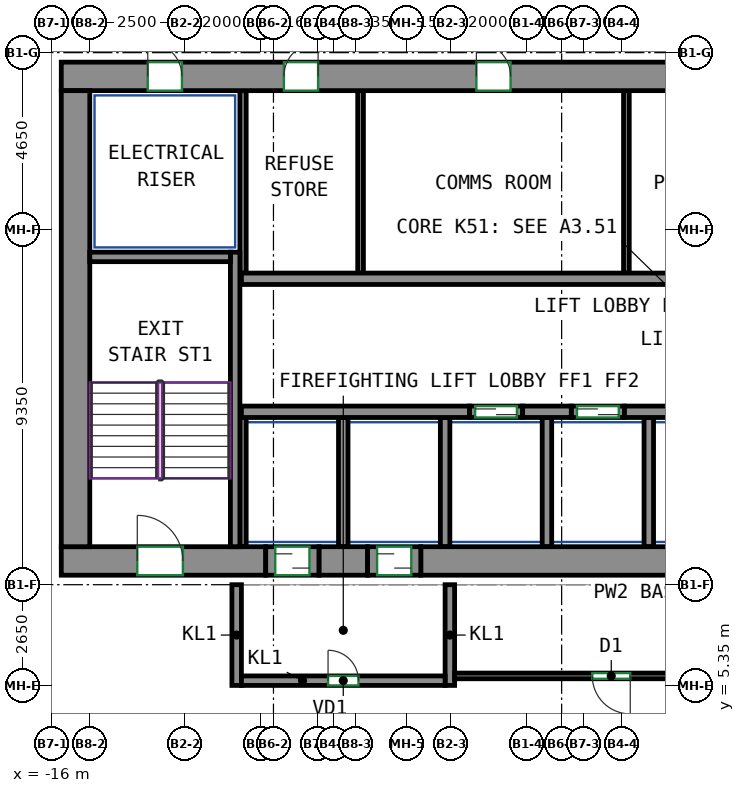
"""IFC4 building model, lengths in metres.
Left out: names, types, materials, properties, quantities, classifications, styles, units other than length and angle.
Written with IfcOpenShell. Run it as: python <this file> out.ifc"""

import sys

from ifc_helpers import new_model, si_unit, direction, frame, frame_2d, origin, place, context, subcontext, project, spatial, rectangle, extrude, source, transform, mapped, element, fill, save


model = new_model("IFC4")
c1 = context("Model", 3, precision=1e-05, world=origin(), true_north=direction((0.0, 1.0)))
c2 = subcontext(c1, "Body", "Model", "MODEL_VIEW")
j1 = project(units=[si_unit("LENGTHUNIT", "METRE"), si_unit("PLANEANGLEUNIT", "RADIAN")], contexts=[c1])
p1 = place(None, origin())
s1 = spatial("IfcSite", under=j1, at=p1, CompositionType="ELEMENT")
p2 = place(p1, origin())
s2 = spatial("IfcBuilding", under=s1, at=p2, CompositionType="ELEMENT")
p3 = place(p2, frame((0.0, 0.0, 206.7)))
s3 = spatial("IfcBuildingStorey", under=s2, at=p3, CompositionType="ELEMENT", Elevation=206.7)
m1 = source(origin(), c2, "Body", "SweptSolid", [
    extrude(rectangle(XDim=5.38, YDim=0.75, at=frame_2d((2.69, 0.0))), origin(), (0.0, 0.0, 1.0), 3.12),
])
p4 = place(p3, frame((-15.75, 8.625, 0.0), z_axis=(0.0, 0.0, 1.0), x_axis=(1.0, 0.0, 0.0)))
e1 = element("IfcWall", 1, at=p4, inside=s3, PredefinedType="SHEAR", context=c2, shape_type="MappedRepresentation", body=[
    mapped(m1, transform((0.0, 0.0, 0.0))),
])
p5 = place(p4, frame((2.0, 0.0, 0.0)))
e2 = element("IfcOpeningElement", 2, at=p5, cuts=e1, PredefinedType="OPENING", context=c2, shape_type="SweptSolid", body=[
    extrude(rectangle(XDim=1.2, YDim=2.1, at=frame_2d((0.6, 1.05))), frame((0.0, 0.385, 0.0), z_axis=(0.0, -1.0, 0.0), x_axis=(1.0, 0.0, 0.0)), (0.0, 0.0, 1.0), 0.77),
])
m2 = source(origin(), c2, "Body", "SweptSolid", [
    extrude(rectangle(XDim=1.28, YDim=0.75, at=frame_2d((0.64, 0.0))), origin(), (0.0, 0.0, 1.0), 3.12),
])
p6 = place(p3, frame((-8.97, 8.625, 0.0), z_axis=(0.0, 0.0, 1.0), x_axis=(1.0, 0.0, 0.0)))
e3 = element("IfcWall", 3, at=p6, inside=s3, PredefinedType="SHEAR", context=c2, shape_type="MappedRepresentation", body=[
    mapped(m2, transform((0.0, 0.0, 0.0))),
])
m3 = source(origin(), c2, "Body", "SweptSolid", [
    extrude(rectangle(XDim=14.18, YDim=0.75, at=frame_2d((7.09, 0.0))), origin(), (0.0, 0.0, 1.0), 3.12),
])
p7 = place(p3, frame((-6.29, 8.625, 0.0), z_axis=(0.0, 0.0, 1.0), x_axis=(1.0, 0.0, 0.0)))
e4 = element("IfcWall", 4, at=p7, inside=s3, PredefinedType="SHEAR", context=c2, shape_type="MappedRepresentation", body=[
    mapped(m3, transform((0.0, 0.0, 0.0))),
])
m4 = source(origin(), c2, "Body", "SweptSolid", [
    extrude(rectangle(XDim=33.6, YDim=0.75, at=frame_2d((16.8, 0.0))), origin(), (0.0, 0.0, 1.0), 3.12),
])
p8 = place(p3, frame((-15.75, 21.375, 0.0), z_axis=(0.0, 0.0, 1.0), x_axis=(1.0, 0.0, 0.0)))
e5 = element("IfcWall", 5, at=p8, inside=s3, PredefinedType="SHEAR", context=c2, shape_type="MappedRepresentation", body=[
    mapped(m4, transform((0.0, 0.0, 0.0))),
])
p9 = place(p8, frame((5.858, 0.0, 0.0)))
e6 = element("IfcOpeningElement", 6, at=p9, cuts=e5, PredefinedType="OPENING", context=c2, shape_type="SweptSolid", body=[
    extrude(rectangle(XDim=0.9, YDim=2.1, at=frame_2d((0.45, 1.05))), frame((0.0, 0.385, 0.0), z_axis=(0.0, -1.0, 0.0), x_axis=(1.0, 0.0, 0.0)), (0.0, 0.0, 1.0), 0.77),
])
p10 = place(p8, frame((10.923, 0.0, 0.0)))
e7 = element("IfcOpeningElement", 7, at=p10, cuts=e5, PredefinedType="OPENING", context=c2, shape_type="SweptSolid", body=[
    extrude(rectangle(XDim=0.9, YDim=2.1, at=frame_2d((0.45, 1.05))), frame((0.0, 0.385, 0.0), z_axis=(0.0, -1.0, 0.0), x_axis=(1.0, 0.0, 0.0)), (0.0, 0.0, 1.0), 0.77),
])
p11 = place(p8, frame((16.055, 0.0, 0.0)))
e8 = element("IfcOpeningElement", 8, at=p11, cuts=e5, PredefinedType="OPENING", context=c2, shape_type="SweptSolid", body=[
    extrude(rectangle(XDim=0.9, YDim=2.1, at=frame_2d((0.45, 1.05))), frame((0.0, 0.385, 0.0), z_axis=(0.0, -1.0, 0.0), x_axis=(1.0, 0.0, 0.0)), (0.0, 0.0, 1.0), 0.77),
])
p12 = place(p8, frame((20.879, 0.0, 0.0)))
e9 = element("IfcOpeningElement", 9, at=p12, cuts=e5, PredefinedType="OPENING", context=c2, shape_type="SweptSolid", body=[
    extrude(rectangle(XDim=0.9, YDim=2.1, at=frame_2d((0.45, 1.05))), frame((0.0, 0.385, 0.0), z_axis=(0.0, -1.0, 0.0), x_axis=(1.0, 0.0, 0.0)), (0.0, 0.0, 1.0), 0.77),
])
p13 = place(p8, frame((26.239, 0.0, 0.0)))
e10 = element("IfcOpeningElement", 10, at=p13, cuts=e5, PredefinedType="OPENING", context=c2, shape_type="SweptSolid", body=[
    extrude(rectangle(XDim=0.9, YDim=2.1, at=frame_2d((0.45, 1.05))), frame((0.0, 0.385, 0.0), z_axis=(0.0, -1.0, 0.0), x_axis=(1.0, 0.0, 0.0)), (0.0, 0.0, 1.0), 0.77),
])
p14 = place(p8, frame((2.275, 0.0, 0.0)))
e11 = element("IfcOpeningElement", 11, at=p14, cuts=e5, PredefinedType="OPENING", context=c2, shape_type="SweptSolid", body=[
    extrude(rectangle(XDim=0.9, YDim=2.1, at=frame_2d((0.45, 1.05))), frame((0.0, 0.385, 0.0), z_axis=(0.0, -1.0, 0.0), x_axis=(1.0, 0.0, 0.0)), (0.0, 0.0, 1.0), 0.77),
])
p15 = place(p8, frame((30.425, 0.0, 0.0)))
e12 = element("IfcOpeningElement", 12, at=p15, cuts=e5, PredefinedType="OPENING", context=c2, shape_type="SweptSolid", body=[
    extrude(rectangle(XDim=0.9, YDim=2.1, at=frame_2d((0.45, 1.05))), frame((0.0, 0.385, 0.0), z_axis=(0.0, -1.0, 0.0), x_axis=(1.0, 0.0, 0.0)), (0.0, 0.0, 1.0), 0.77),
])
m5 = source(origin(), c2, "Body", "SweptSolid", [
    extrude(rectangle(XDim=12.0, YDim=0.75, at=frame_2d((6.0, 0.0))), origin(), (0.0, 0.0, 1.0), 3.12),
])
p16 = place(p3, frame((-15.375, 9.0, 0.0), z_axis=(0.0, 0.0, 1.0), x_axis=(0.0, 1.0, 0.0)))
e13 = element("IfcWall", 13, at=p16, inside=s3, PredefinedType="SHEAR", context=c2, shape_type="MappedRepresentation", body=[
    mapped(m5, transform((0.0, 0.0, 0.0))),
])
m6 = source(origin(), c2, "Body", "SweptSolid", [
    extrude(rectangle(XDim=7.75, YDim=0.25, at=frame_2d((3.875, 0.0))), origin(), (0.0, 0.0, 1.0), 3.12),
])
p17 = place(p3, frame((-11.175, 9.0, 0.0), z_axis=(0.0, 0.0, 1.0), x_axis=(0.0, 1.0, 0.0)))
e14 = element("IfcWall", 14, at=p17, inside=s3, PredefinedType="SHEAR", context=c2, shape_type="MappedRepresentation", body=[
    mapped(m6, transform((0.0, 0.0, 0.0))),
])
m7 = source(origin(), c2, "Body", "SweptSolid", [
    extrude(rectangle(XDim=3.7, YDim=0.25, at=frame_2d((1.85, 0.0))), origin(), (0.0, 0.0, 1.0), 3.12),
])
p18 = place(p3, frame((-15.0, 16.625, 0.0), z_axis=(0.0, 0.0, 1.0), x_axis=(1.0, 0.0, 0.0)))
e15 = element("IfcWall", 15, at=p18, inside=s3, PredefinedType="SHEAR", context=c2, shape_type="MappedRepresentation", body=[
    mapped(m7, transform((0.0, 0.0, 0.0))),
])
m8 = source(origin(), c2, "Body", "SweptSolid", [
    extrude(rectangle(XDim=6.0, YDim=0.3, at=frame_2d((3.0, 0.0))), origin(), (0.0, 0.0, 1.0), 3.12),
])
p19 = place(p3, frame((-11.01, 12.55, 0.0), z_axis=(0.0, 0.0, 1.0), x_axis=(1.0, 0.0, 0.0)))
e16 = element("IfcWall", 16, at=p19, inside=s3, PredefinedType="SHEAR", context=c2, shape_type="MappedRepresentation", body=[
    mapped(m8, transform((0.0, 0.0, 0.0))),
])
m9 = source(origin(), c2, "Body", "SweptSolid", [
    extrude(rectangle(XDim=1.28, YDim=0.3, at=frame_2d((0.64, 0.0))), origin(), (0.0, 0.0, 1.0), 3.12),
])
for number, where, z_axis, x_axis in (
    (17, (-3.61, 12.55, 0.0), (0.0, 0.0, 1.0), (1.0, 0.0, 0.0)),
    (18, (-0.93, 12.55, 0.0), (0.0, 0.0, 1.0), (1.0, 0.0, 0.0)),
):
    element("IfcWall", number, at=place(p3, frame(where, z_axis=z_axis, x_axis=x_axis)), inside=s3, PredefinedType="SHEAR", context=c2, shape_type="MappedRepresentation", body=[
        mapped(m9, transform((0.0, 0.0, 0.0))),
    ])
m10 = source(origin(), c2, "Body", "SweptSolid", [
    extrude(rectangle(XDim=14.04, YDim=0.3, at=frame_2d((7.02, 0.0))), origin(), (0.0, 0.0, 1.0), 3.12),
])
p20 = place(p3, frame((-11.01, 16.05, 0.0), z_axis=(0.0, 0.0, 1.0), x_axis=(1.0, 0.0, 0.0)))
e19 = element("IfcWall", 19, at=p20, inside=s3, PredefinedType="SHEAR", context=c2, shape_type="MappedRepresentation", body=[
    mapped(m10, transform((0.0, 0.0, 0.0))),
])
m11 = source(origin(), c2, "Body", "SweptSolid", [
    extrude(rectangle(XDim=1.4, YDim=0.3, at=frame_2d((0.7, 0.0))), origin(), (0.0, 0.0, 1.0), 3.12),
])
p21 = place(p3, frame((-5.01, 12.55, 0.0), z_axis=(0.0, 0.0, 1.0), x_axis=(1.0, 0.0, 0.0)))
e20 = element("IfcWall", 20, at=p21, inside=s3, PredefinedType="PARTITIONING", context=c2, shape_type="MappedRepresentation", body=[
    mapped(m11, transform((0.0, 0.0, 0.0))),
])
p22 = place(p21, frame((0.15, 0.0, 0.0)))
e21 = element("IfcOpeningElement", 21, at=p22, cuts=e20, PredefinedType="OPENING", context=c2, shape_type="SweptSolid", body=[
    extrude(rectangle(XDim=1.1, YDim=2.1, at=frame_2d((0.55, 1.05))), frame((0.0, 0.16, 0.0), z_axis=(0.0, -1.0, 0.0), x_axis=(1.0, 0.0, 0.0)), (0.0, 0.0, 1.0), 0.32),
])
m12 = source(origin(), c2, "Body", "SweptSolid", [
    extrude(rectangle(XDim=1.4, YDim=0.3, at=frame_2d((0.7, 0.0))), origin(), (0.0, 0.0, 1.0), 3.12),
])
p23 = place(p3, frame((-2.33, 12.55, 0.0), z_axis=(0.0, 0.0, 1.0), x_axis=(1.0, 0.0, 0.0)))
e22 = element("IfcWall", 22, at=p23, inside=s3, PredefinedType="PARTITIONING", context=c2, shape_type="MappedRepresentation", body=[
    mapped(m12, transform((0.0, 0.0, 0.0))),
])
p24 = place(p23, frame((0.15, 0.0, 0.0)))
e23 = element("IfcOpeningElement", 23, at=p24, cuts=e22, PredefinedType="OPENING", context=c2, shape_type="SweptSolid", body=[
    extrude(rectangle(XDim=1.1, YDim=2.1, at=frame_2d((0.55, 1.05))), frame((0.0, 0.16, 0.0), z_axis=(0.0, -1.0, 0.0), x_axis=(1.0, 0.0, 0.0)), (0.0, 0.0, 1.0), 0.32),
])
m13 = source(origin(), c2, "Body", "SweptSolid", [
    extrude(rectangle(XDim=2.65, YDim=0.25, at=frame_2d((1.325, 0.0))), origin(), (0.0, 0.0, 1.0), 3.12),
])
for number, where, z_axis, x_axis in (
    (24, (-11.135, 5.35, 0.0), (0.0, 0.0, 1.0), (0.0, 1.0, 0.0)),
    (25, (-5.525, 5.35, 0.0), (0.0, 0.0, 1.0), (0.0, 1.0, 0.0)),
):
    element("IfcWall", number, at=place(p3, frame(where, z_axis=z_axis, x_axis=x_axis)), inside=s3, PredefinedType="PARTITIONING", context=c2, shape_type="MappedRepresentation", body=[
        mapped(m13, transform((0.0, 0.0, 0.0))),
    ])
m14 = source(origin(), c2, "Body", "SweptSolid", [
    extrude(rectangle(XDim=5.36, YDim=0.25, at=frame_2d((2.68, 0.0))), origin(), (0.0, 0.0, 1.0), 3.12),
])
p25 = place(p3, frame((-11.01, 5.475, 0.0), z_axis=(0.0, 0.0, 1.0), x_axis=(1.0, 0.0, 0.0)))
e26 = element("IfcWall", 26, at=p25, inside=s3, PredefinedType="PARTITIONING", context=c2, shape_type="MappedRepresentation", body=[
    mapped(m14, transform((0.0, 0.0, 0.0))),
])
p26 = place(p25, frame((2.28, 0.0, 0.0)))
e27 = element("IfcOpeningElement", 27, at=p26, cuts=e26, PredefinedType="OPENING", context=c2, shape_type="SweptSolid", body=[
    extrude(rectangle(XDim=0.8, YDim=2.0, at=frame_2d((0.4, 1.0))), frame((0.0, 0.135, 0.0), z_axis=(0.0, -1.0, 0.0), x_axis=(1.0, 0.0, 0.0)), (0.0, 0.0, 1.0), 0.27),
])
m15 = source(origin(), c2, "Body", "SweptSolid", [
    extrude(rectangle(XDim=4.8, YDim=0.165, at=frame_2d((2.4, 0.0))), origin(), (0.0, 0.0, 1.0), 3.12),
])
p27 = place(p3, frame((-10.968, 16.2, 0.0), z_axis=(0.0, 0.0, 1.0), x_axis=(0.0, 1.0, 0.0)))
e28 = element("IfcWall", 28, at=p27, inside=s3, PredefinedType="PARTITIONING", context=c2, shape_type="MappedRepresentation", body=[
    mapped(m15, transform((0.0, 0.0, 0.0))),
])
m16 = source(origin(), c2, "Body", "SweptSolid", [
    extrude(rectangle(XDim=3.4, YDim=0.25, at=frame_2d((1.7, 0.0))), origin(), (0.0, 0.0, 1.0), 3.12),
])
p28 = place(p3, frame((-0.29, 9.0, 0.0), z_axis=(0.0, 0.0, 1.0), x_axis=(0.0, 1.0, 0.0)))
e29 = element("IfcWall", 29, at=p28, inside=s3, PredefinedType="PARTITIONING", context=c2, shape_type="MappedRepresentation", body=[
    mapped(m16, transform((0.0, 0.0, 0.0))),
])
m17 = source(origin(), c2, "Body", "SweptSolid", [
    extrude(rectangle(XDim=3.4, YDim=0.165, at=frame_2d((1.7, 0.0))), origin(), (0.0, 0.0, 1.0), 3.12),
])
p29 = place(p3, frame((-10.968, 9.0, 0.0), z_axis=(0.0, 0.0, 1.0), x_axis=(0.0, 1.0, 0.0)))
e30 = element("IfcWall", 30, at=p29, inside=s3, PredefinedType="PARTITIONING", context=c2, shape_type="MappedRepresentation", body=[
    mapped(m17, transform((0.0, 0.0, 0.0))),
])
for number, where, z_axis, x_axis in (
    (31, (-2.97, 9.0, 0.0), (0.0, 0.0, 1.0), (0.0, 1.0, 0.0)),
    (32, (-5.65, 9.0, 0.0), (0.0, 0.0, 1.0), (0.0, 1.0, 0.0)),
    (33, (-8.33, 9.0, 0.0), (0.0, 0.0, 1.0), (0.0, 1.0, 0.0)),
):
    element("IfcWall", number, at=place(p3, frame(where, z_axis=z_axis, x_axis=x_axis)), inside=s3, PredefinedType="PARTITIONING", context=c2, shape_type="MappedRepresentation", body=[
        mapped(m16, transform((0.0, 0.0, 0.0))),
    ])
m18 = source(origin(), c2, "Body", "SweptSolid", [
    extrude(rectangle(XDim=4.8, YDim=0.15, at=frame_2d((2.4, 0.0))), origin(), (0.0, 0.0, 1.0), 3.12),
])
for number, where, z_axis, x_axis in (
    (34, (-7.875, 16.2, 0.0), (0.0, 0.0, 1.0), (0.0, 1.0, 0.0)),
    (35, (-0.88, 16.2, 0.0), (0.0, 0.0, 1.0), (0.0, 1.0, 0.0)),
):
    element("IfcWall", number, at=place(p3, frame(where, z_axis=z_axis, x_axis=x_axis)), inside=s3, PredefinedType="PARTITIONING", context=c2, shape_type="MappedRepresentation", body=[
        mapped(m18, transform((0.0, 0.0, 0.0))),
    ])
m19 = source(origin(), c2, "Body", "SweptSolid", [
    extrude(rectangle(XDim=1.4, YDim=0.75, at=frame_2d((0.7, 0.0))), origin(), (0.0, 0.0, 1.0), 2.7),
])
p30 = place(p3, frame((-10.37, 8.625, 0.0), z_axis=(0.0, 0.0, 1.0), x_axis=(1.0, 0.0, 0.0)))
e36 = element("IfcWall", 36, at=p30, inside=s3, PredefinedType="PARTITIONING", context=c2, shape_type="MappedRepresentation", body=[
    mapped(m19, transform((0.0, 0.0, 0.0))),
])
p31 = place(p30, frame((0.25, 0.0, 0.0)))
e37 = element("IfcOpeningElement", 37, at=p31, cuts=e36, PredefinedType="OPENING", context=c2, shape_type="SweptSolid", body=[
    extrude(rectangle(XDim=0.9, YDim=2.1, at=frame_2d((0.45, 1.05))), frame((0.0, 0.385, 0.0), z_axis=(0.0, -1.0, 0.0), x_axis=(1.0, 0.0, 0.0)), (0.0, 0.0, 1.0), 0.77),
])
m20 = source(origin(), c2, "Body", "SweptSolid", [
    extrude(rectangle(XDim=1.4, YDim=0.75, at=frame_2d((0.7, 0.0))), origin(), (0.0, 0.0, 1.0), 2.7),
])
p32 = place(p3, frame((-7.69, 8.625, 0.0), z_axis=(0.0, 0.0, 1.0), x_axis=(1.0, 0.0, 0.0)))
e38 = element("IfcWall", 38, at=p32, inside=s3, PredefinedType="PARTITIONING", context=c2, shape_type="MappedRepresentation", body=[
    mapped(m20, transform((0.0, 0.0, 0.0))),
])
p33 = place(p32, frame((0.25, 0.0, 0.0)))
e39 = element("IfcOpeningElement", 39, at=p33, cuts=e38, PredefinedType="OPENING", context=c2, shape_type="SweptSolid", body=[
    extrude(rectangle(XDim=0.9, YDim=2.1, at=frame_2d((0.45, 1.05))), frame((0.0, 0.385, 0.0), z_axis=(0.0, -1.0, 0.0), x_axis=(1.0, 0.0, 0.0)), (0.0, 0.0, 1.0), 0.77),
])
p34 = place(p3, frame((7.875, 5.6, 0.0), z_axis=(0.0, 0.0, 1.0), x_axis=(-1.0, 0.0, 0.0)))
e40 = element("IfcWall", 40, at=p34, inside=s3, PredefinedType="PARTITIONING", context=c2, shape_type="SweptSolid", body=[
    extrude(rectangle(XDim=13.275, YDim=0.15, at=frame_2d((6.637, 0.0))), origin(), (0.0, 0.0, 1.0), 3.12),
])
p35 = place(p34, frame((8.653, 0.0, 0.0)))
e41 = element("IfcOpeningElement", 41, at=p35, cuts=e40, PredefinedType="OPENING", context=c2, shape_type="SweptSolid", body=[
    extrude(rectangle(XDim=1.0, YDim=2.1, at=frame_2d((0.5, 1.05))), frame((0.0, 0.085, 0.0), z_axis=(0.0, -1.0, 0.0), x_axis=(1.0, 0.0, 0.0)), (0.0, 0.0, 1.0), 0.17),
])
p36 = place(p26, origin())
e42 = element("IfcDoor", 42, at=p36, inside=s3, OperationType="SINGLE_SWING_LEFT", PredefinedType="DOOR", context=c2, shape_type="SweptSolid", body=[
    extrude(rectangle(XDim=0.8, YDim=2.0, at=frame_2d((0.4, 1.0))), frame((0.0, 0.025, 0.0), z_axis=(0.0, -1.0, 0.0), x_axis=(1.0, 0.0, 0.0)), (0.0, 0.0, 1.0), 0.05),
])
fill(e27, e42)
p37 = place(p31, origin())
e43 = element("IfcDoor", 43, at=p37, inside=s3, OperationType="SLIDING_TO_LEFT", PredefinedType="DOOR", context=c2, shape_type="SweptSolid", body=[
    extrude(rectangle(XDim=0.9, YDim=2.1, at=frame_2d((0.45, 1.05))), frame((0.0, 0.28, 0.0), z_axis=(0.0, -1.0, 0.0), x_axis=(1.0, 0.0, 0.0)), (0.0, 0.0, 1.0), 0.05),
])
fill(e37, e43)
p38 = place(p33, origin())
e44 = element("IfcDoor", 44, at=p38, inside=s3, OperationType="SLIDING_TO_RIGHT", PredefinedType="DOOR", context=c2, shape_type="SweptSolid", body=[
    extrude(rectangle(XDim=0.9, YDim=2.1, at=frame_2d((0.45, 1.05))), frame((0.0, 0.28, 0.0), z_axis=(0.0, -1.0, 0.0), x_axis=(1.0, 0.0, 0.0)), (0.0, 0.0, 1.0), 0.05),
])
fill(e39, e44)
p39 = place(p22, origin())
e45 = element("IfcDoor", 45, at=p39, inside=s3, OperationType="DOUBLE_DOOR_SLIDING", PredefinedType="DOOR", context=c2, shape_type="SweptSolid", body=[
    extrude(rectangle(XDim=1.1, YDim=2.1, at=frame_2d((0.55, 1.05))), frame((0.0, 0.025, 0.0), z_axis=(0.0, -1.0, 0.0), x_axis=(1.0, 0.0, 0.0)), (0.0, 0.0, 1.0), 0.05),
])
fill(e21, e45)
p40 = place(p24, origin())
e46 = element("IfcDoor", 46, at=p40, inside=s3, OperationType="DOUBLE_DOOR_SLIDING", PredefinedType="DOOR", context=c2, shape_type="SweptSolid", body=[
    extrude(rectangle(XDim=1.1, YDim=2.1, at=frame_2d((0.55, 1.05))), frame((0.0, 0.025, 0.0), z_axis=(0.0, -1.0, 0.0), x_axis=(1.0, 0.0, 0.0)), (0.0, 0.0, 1.0), 0.05),
])
fill(e23, e46)
p41 = place(p9, origin())
e47 = element("IfcDoor", 47, at=p41, inside=s3, OperationType="SINGLE_SWING_RIGHT", PredefinedType="DOOR", context=c2, shape_type="SweptSolid", body=[
    extrude(rectangle(XDim=0.9, YDim=2.1, at=frame_2d((0.45, 1.05))), frame((0.0, -0.23, 0.0), z_axis=(0.0, -1.0, 0.0), x_axis=(1.0, 0.0, 0.0)), (0.0, 0.0, 1.0), 0.05),
])
fill(e6, e47)
p42 = place(p10, origin())
e48 = element("IfcDoor", 48, at=p42, inside=s3, OperationType="SINGLE_SWING_LEFT", PredefinedType="DOOR", context=c2, shape_type="SweptSolid", body=[
    extrude(rectangle(XDim=0.9, YDim=2.1, at=frame_2d((0.45, 1.05))), frame((0.0, -0.23, 0.0), z_axis=(0.0, -1.0, 0.0), x_axis=(1.0, 0.0, 0.0)), (0.0, 0.0, 1.0), 0.05),
])
fill(e7, e48)
p43 = place(p14, origin())
e49 = element("IfcDoor", 49, at=p43, inside=s3, OperationType="SINGLE_SWING_LEFT", PredefinedType="DOOR", context=c2, shape_type="SweptSolid", body=[
    extrude(rectangle(XDim=0.9, YDim=2.1, at=frame_2d((0.45, 1.05))), frame((0.0, -0.23, 0.0), z_axis=(0.0, -1.0, 0.0), x_axis=(1.0, 0.0, 0.0)), (0.0, 0.0, 1.0), 0.05),
])
fill(e11, e49)
p44 = place(p5, origin())
e50 = element("IfcDoor", 50, at=p44, inside=s3, OperationType="DOUBLE_DOOR_SINGLE_SWING", PredefinedType="DOOR", context=c2, shape_type="SweptSolid", body=[
    extrude(rectangle(XDim=1.2, YDim=2.1, at=frame_2d((0.6, 1.05))), frame((0.0, 0.28, 0.0), z_axis=(0.0, -1.0, 0.0), x_axis=(1.0, 0.0, 0.0)), (0.0, 0.0, 1.0), 0.05),
])
fill(e2, e50)
p45 = place(p35, origin())
e51 = element("IfcDoor", 51, at=p45, inside=s3, OperationType="SINGLE_SWING_LEFT", PredefinedType="DOOR", context=c2, shape_type="SweptSolid", body=[
    extrude(rectangle(XDim=1.0, YDim=2.1, at=frame_2d((0.5, 1.05))), frame((0.0, 0.025, 0.0), z_axis=(0.0, -1.0, 0.0), x_axis=(1.0, 0.0, 0.0)), (0.0, 0.0, 1.0), 0.05),
])
fill(e41, e51)
save(model, sys.argv[1])
